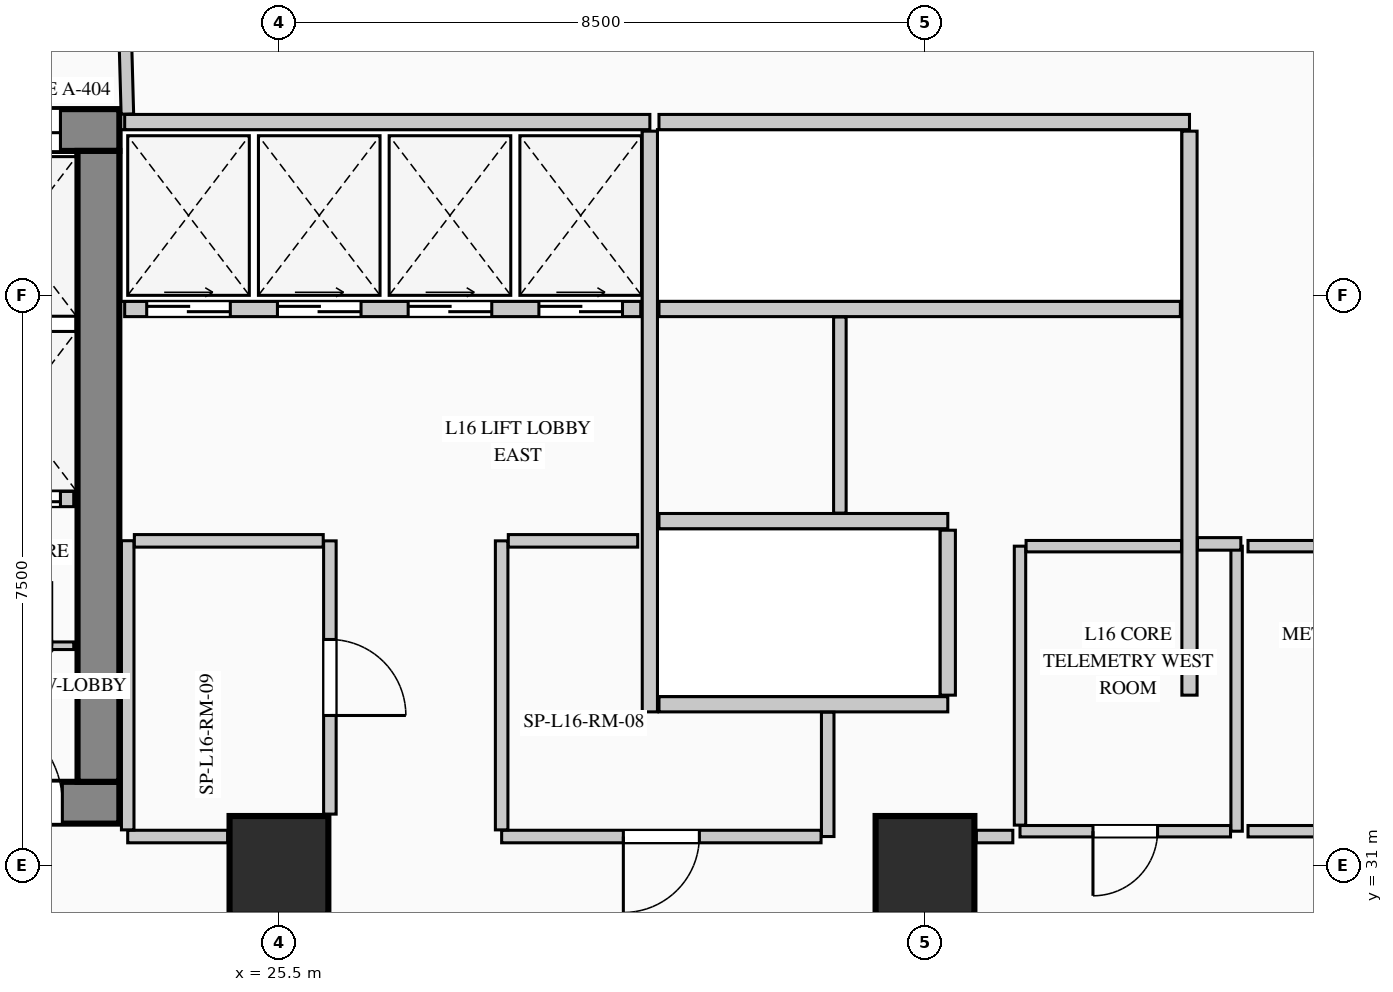
"""IFC4 building model, lengths in metres.
Left out: names, types, materials, properties, quantities, classifications, styles, units other than length and angle.
Written with IfcOpenShell. Run it as: python <this file> out.ifc"""

import sys

from ifc_helpers import new_model, si_unit, direction, frame, frame_2d, origin, origin_2d, place, context, subcontext, project, spatial, rectangle, extrude, element, fill, save


model = new_model("IFC4")
c1 = context("Model", 3, precision=1e-05, world=origin(), true_north=direction((0.0, 1.0)))
c2 = subcontext(c1, "Body", "Model", "MODEL_VIEW")
j1 = project(units=[si_unit("LENGTHUNIT", "METRE"), si_unit("PLANEANGLEUNIT", "RADIAN")], contexts=[c1])
p1 = place(None, origin())
s1 = spatial("IfcSite", under=j1, at=p1, CompositionType="ELEMENT")
p2 = place(p1, origin())
s2 = spatial("IfcBuilding", under=s1, at=p2, CompositionType="ELEMENT")
p3 = place(p2, frame((0.0, 0.0, 71.0)))
s3 = spatial("IfcBuildingStorey", under=s2, at=p3, CompositionType="ELEMENT", Elevation=71.0)
p4 = place(p3, frame((5.45, 40.675, 0.0), z_axis=(0.0, 0.0, 1.0), x_axis=(1.0, 0.0, 0.0)))
e1 = element("IfcWall", 1, at=p4, inside=s3, PredefinedType="SHEAR", context=c2, shape_type="SweptSolid", body=[
    extrude(rectangle(XDim=17.95, YDim=0.55, at=frame_2d((8.975, 0.0))), origin(), (0.0, 0.0, 1.0), 4.4),
])
p5 = place(p4, frame((15.995, 0.0, 0.0)))
e2 = element("IfcOpeningElement", 2, at=p5, cuts=e1, PredefinedType="OPENING", context=c2, shape_type="SweptSolid", body=[
    extrude(rectangle(XDim=1.18, YDim=2.25, at=frame_2d((0.59, 1.125))), frame((0.0, 0.285, 0.0), z_axis=(0.0, -1.0, 0.0), x_axis=(1.0, 0.0, 0.0)), (0.0, 0.0, 1.0), 0.57),
])
p6 = place(p3, frame((5.45, 31.825, 0.0), z_axis=(0.0, 0.0, 1.0), x_axis=(1.0, 0.0, 0.0)))
e3 = element("IfcWall", 3, at=p6, inside=s3, PredefinedType="SHEAR", context=c2, shape_type="SweptSolid", body=[
    extrude(rectangle(XDim=17.95, YDim=0.55, at=frame_2d((8.975, 0.0))), origin(), (0.0, 0.0, 1.0), 4.4),
])
p7 = place(p6, frame((3.2, 0.0, 0.0)))
e4 = element("IfcOpeningElement", 4, at=p7, cuts=e3, PredefinedType="OPENING", context=c2, shape_type="SweptSolid", body=[
    extrude(rectangle(XDim=1.2, YDim=2.2, at=frame_2d((0.6, 1.1))), frame((0.0, 0.285, 0.0), z_axis=(0.0, -1.0, 0.0), x_axis=(1.0, 0.0, 0.0)), (0.0, 0.0, 1.0), 0.57),
])
p8 = place(p6, frame((7.05, 0.0, 0.0)))
e5 = element("IfcOpeningElement", 5, at=p8, cuts=e3, PredefinedType="OPENING", context=c2, shape_type="SweptSolid", body=[
    extrude(rectangle(XDim=1.2, YDim=2.2, at=frame_2d((0.6, 1.1))), frame((0.0, 0.285, 0.0), z_axis=(0.0, -1.0, 0.0), x_axis=(1.0, 0.0, 0.0)), (0.0, 0.0, 1.0), 0.57),
])
p9 = place(p6, frame((8.9, 0.0, 0.0)))
e6 = element("IfcOpeningElement", 6, at=p9, cuts=e3, PredefinedType="OPENING", context=c2, shape_type="SweptSolid", body=[
    extrude(rectangle(XDim=1.15, YDim=2.2, at=frame_2d((0.575, 1.1))), frame((0.0, 0.285, 0.0), z_axis=(0.0, -1.0, 0.0), x_axis=(1.0, 0.0, 0.0)), (0.0, 0.0, 1.0), 0.57),
])
p10 = place(p6, frame((16.0, 0.0, 0.0)))
e7 = element("IfcOpeningElement", 7, at=p10, cuts=e3, PredefinedType="OPENING", context=c2, shape_type="SweptSolid", body=[
    extrude(rectangle(XDim=1.2, YDim=2.2, at=frame_2d((0.6, 1.1))), frame((0.0, 0.285, 0.0), z_axis=(0.0, -1.0, 0.0), x_axis=(1.0, 0.0, 0.0)), (0.0, 0.0, 1.0), 0.57),
])
p11 = place(p3, frame((23.125, 32.1, 0.0), z_axis=(0.0, 0.0, 1.0), x_axis=(0.0, 1.0, 0.0)))
e8 = element("IfcWall", 8, at=p11, inside=s3, PredefinedType="SHEAR", context=c2, shape_type="SweptSolid", body=[
    extrude(rectangle(XDim=8.3, YDim=0.55, at=frame_2d((4.15, 0.0))), origin(), (0.0, 0.0, 1.0), 4.4),
])
for number, where, z_axis, x_axis in (
    (9, (25.5, 31.0, 0.0), (0.0, 0.0, 1.0), (1.0, 0.0, 0.0)),
    (10, (34.0, 31.0, 0.0), (0.0, 0.0, 1.0), (1.0, 0.0, 0.0)),
):
    element("IfcColumn", number, at=place(p3, frame(where, z_axis=z_axis, x_axis=x_axis)), inside=s3, PredefinedType="COLUMN", context=c2, shape_type="SweptSolid", body=[
        extrude(rectangle(XDim=1.3, YDim=1.3, at=origin_2d()), origin(), (0.0, 0.0, 1.0), 4.4),
    ])
p12 = place(p3, frame((21.38, 33.89, 0.0), z_axis=(0.0, 0.0, 1.0), x_axis=(1.0, 0.0, 0.0)))
e11 = element("IfcWall", 11, at=p12, inside=s3, PredefinedType="PARTITIONING", context=c2, shape_type="SweptSolid", body=[
    extrude(rectangle(XDim=1.42, YDim=0.1, at=frame_2d((0.71, 0.0))), origin(), (0.0, 0.0, 1.0), 4.1),
])
p13 = place(p12, frame((0.28, 0.0, 0.0)))
e12 = element("IfcOpeningElement", 12, at=p13, cuts=e11, PredefinedType="OPENING", context=c2, shape_type="SweptSolid", body=[
    extrude(rectangle(XDim=0.85, YDim=2.1, at=frame_2d((0.425, 1.05))), frame((0.0, 0.06, 0.0), z_axis=(0.0, -1.0, 0.0), x_axis=(1.0, 0.0, 0.0)), (0.0, 0.0, 1.0), 0.12),
])
p14 = place(p3, frame((21.3, 35.82, 0.0), z_axis=(0.0, 0.0, 1.0), x_axis=(1.0, 0.0, 0.0)))
e13 = element("IfcWall", 13, at=p14, inside=s3, PredefinedType="PARTITIONING", context=c2, shape_type="SweptSolid", body=[
    extrude(rectangle(XDim=1.5, YDim=0.2, at=frame_2d((0.75, 0.0))), origin(), (0.0, 0.0, 1.0), 4.1),
])
p15 = place(p14, frame((0.145, 0.0, 0.0)))
e14 = element("IfcOpeningElement", 14, at=p15, cuts=e13, PredefinedType="OPENING", context=c2, shape_type="SweptSolid", body=[
    extrude(rectangle(XDim=1.18, YDim=2.25, at=frame_2d((0.59, 1.125))), frame((0.0, 0.11, 0.0), z_axis=(0.0, -1.0, 0.0), x_axis=(1.0, 0.0, 0.0)), (0.0, 0.0, 1.0), 0.22),
])
p16 = place(p3, frame((23.47, 40.78, 0.0), z_axis=(0.0, 0.0, 1.0), x_axis=(1.0, 0.0, 0.0)))
e15 = element("IfcWall", 15, at=p16, inside=s3, PredefinedType="PARTITIONING", context=c2, shape_type="SweptSolid", body=[
    extrude(rectangle(XDim=6.91, YDim=0.2, at=frame_2d((3.455, 0.0))), origin(), (0.0, 0.0, 1.0), 4.1),
])
p17 = place(p3, frame((30.38, 33.02, 0.0), z_axis=(0.0, 0.0, 1.0), x_axis=(0.0, 1.0, 0.0)))
e16 = element("IfcWall", 16, at=p17, inside=s3, PredefinedType="PARTITIONING", context=c2, shape_type="SweptSolid", body=[
    extrude(rectangle(XDim=7.64, YDim=0.2, at=frame_2d((3.82, 0.0))), origin(), (0.0, 0.0, 1.0), 4.1),
])
p18 = place(p3, frame((23.47, 38.32, 0.0), z_axis=(0.0, 0.0, 1.0), x_axis=(1.0, 0.0, 0.0)))
e17 = element("IfcWall", 17, at=p18, inside=s3, PredefinedType="PARTITIONING", context=c2, shape_type="SweptSolid", body=[
    extrude(rectangle(XDim=6.79, YDim=0.2, at=frame_2d((3.395, 0.0))), origin(), (0.0, 0.0, 1.0), 4.1),
])
p19 = place(p18, frame((0.29, 0.0, 0.0)))
e18 = element("IfcOpeningElement", 18, at=p19, cuts=e17, PredefinedType="OPENING", context=c2, shape_type="SweptSolid", body=[
    extrude(rectangle(XDim=1.1, YDim=2.2, at=frame_2d((0.55, 1.1))), frame((0.0, 0.11, 0.0), z_axis=(0.0, -1.0, 0.0), x_axis=(1.0, 0.0, 0.0)), (0.0, 0.0, 1.0), 0.22),
])
p20 = place(p18, frame((2.01, 0.0, 0.0)))
e19 = element("IfcOpeningElement", 19, at=p20, cuts=e17, PredefinedType="OPENING", context=c2, shape_type="SweptSolid", body=[
    extrude(rectangle(XDim=1.1, YDim=2.2, at=frame_2d((0.55, 1.1))), frame((0.0, 0.11, 0.0), z_axis=(0.0, -1.0, 0.0), x_axis=(1.0, 0.0, 0.0)), (0.0, 0.0, 1.0), 0.22),
])
p21 = place(p18, frame((3.73, 0.0, 0.0)))
e20 = element("IfcOpeningElement", 20, at=p21, cuts=e17, PredefinedType="OPENING", context=c2, shape_type="SweptSolid", body=[
    extrude(rectangle(XDim=1.1, YDim=2.2, at=frame_2d((0.55, 1.1))), frame((0.0, 0.11, 0.0), z_axis=(0.0, -1.0, 0.0), x_axis=(1.0, 0.0, 0.0)), (0.0, 0.0, 1.0), 0.22),
])
p22 = place(p18, frame((5.45, 0.0, 0.0)))
e21 = element("IfcOpeningElement", 21, at=p22, cuts=e17, PredefinedType="OPENING", context=c2, shape_type="SweptSolid", body=[
    extrude(rectangle(XDim=1.1, YDim=2.2, at=frame_2d((0.55, 1.1))), frame((0.0, 0.11, 0.0), z_axis=(0.0, -1.0, 0.0), x_axis=(1.0, 0.0, 0.0)), (0.0, 0.0, 1.0), 0.22),
])
p23 = place(p3, frame((30.5, 40.78, 0.0), z_axis=(0.0, 0.0, 1.0), x_axis=(1.0, 0.0, 0.0)))
e22 = element("IfcWall", 22, at=p23, inside=s3, PredefinedType="PARTITIONING", context=c2, shape_type="SweptSolid", body=[
    extrude(rectangle(XDim=6.98, YDim=0.2, at=frame_2d((3.49, 0.0))), origin(), (0.0, 0.0, 1.0), 4.1),
])
p24 = place(p3, frame((37.48, 33.24, 0.0), z_axis=(0.0, 0.0, 1.0), x_axis=(0.0, 1.0, 0.0)))
e23 = element("IfcWall", 23, at=p24, inside=s3, PredefinedType="PARTITIONING", context=c2, shape_type="SweptSolid", body=[
    extrude(rectangle(XDim=7.42, YDim=0.2, at=frame_2d((3.71, 0.0))), origin(), (0.0, 0.0, 1.0), 4.1),
])
p25 = place(p3, frame((30.5, 38.32, 0.0), z_axis=(0.0, 0.0, 1.0), x_axis=(1.0, 0.0, 0.0)))
e24 = element("IfcWall", 24, at=p25, inside=s3, PredefinedType="PARTITIONING", context=c2, shape_type="SweptSolid", body=[
    extrude(rectangle(XDim=6.86, YDim=0.2, at=frame_2d((3.43, 0.0))), origin(), (0.0, 0.0, 1.0), 4.1),
])
for number, where, z_axis, x_axis in (
    (25, (30.5, 35.53, 0.0), (0.0, 0.0, 1.0), (1.0, 0.0, 0.0)),
    (26, (30.5, 33.12, 0.0), (0.0, 0.0, 1.0), (1.0, 0.0, 0.0)),
):
    element("IfcWall", number, at=place(p3, frame(where, z_axis=z_axis, x_axis=x_axis)), inside=s3, PredefinedType="PARTITIONING", context=c2, shape_type="SweptSolid", body=[
        extrude(rectangle(XDim=3.8, YDim=0.2, at=frame_2d((1.9, 0.0))), origin(), (0.0, 0.0, 1.0), 4.1),
    ])
p26 = place(p3, frame((34.3, 33.24, 0.0), z_axis=(0.0, 0.0, 1.0), x_axis=(0.0, 1.0, 0.0)))
e27 = element("IfcWall", 27, at=p26, inside=s3, PredefinedType="PARTITIONING", context=c2, shape_type="SweptSolid", body=[
    extrude(rectangle(XDim=2.17, YDim=0.2, at=frame_2d((1.085, 0.0))), origin(), (0.0, 0.0, 1.0), 4.1),
])
p27 = place(p3, frame((38.1, 35.2, 0.0), z_axis=(0.0, 0.0, 1.0), x_axis=(0.0, -1.0, 0.0)))
e28 = element("IfcWall", 28, at=p27, inside=s3, PredefinedType="PARTITIONING", context=c2, shape_type="SweptSolid", body=[
    extrude(rectangle(XDim=3.75, YDim=0.15, at=frame_2d((1.875, 0.0))), origin(), (0.0, 0.0, 1.0), 4.1),
])
p28 = place(p3, frame((38.02, 31.45, 0.0), z_axis=(0.0, 0.0, 1.0), x_axis=(-1.0, 0.0, 0.0)))
e29 = element("IfcWall", 29, at=p28, inside=s3, PredefinedType="PARTITIONING", context=c2, shape_type="SweptSolid", body=[
    extrude(rectangle(XDim=2.77, YDim=0.15, at=frame_2d((1.385, 0.0))), origin(), (0.0, 0.0, 1.0), 4.1),
])
p29 = place(p28, frame((0.96, 0.0, 0.0)))
e30 = element("IfcOpeningElement", 30, at=p29, cuts=e29, PredefinedType="OPENING", context=c2, shape_type="SweptSolid", body=[
    extrude(rectangle(XDim=0.85, YDim=2.1, at=frame_2d((0.425, 1.05))), frame((0.0, 0.085, 0.0), z_axis=(0.0, -1.0, 0.0), x_axis=(1.0, 0.0, 0.0)), (0.0, 0.0, 1.0), 0.17),
])
p30 = place(p3, frame((35.25, 31.53, 0.0), z_axis=(0.0, 0.0, 1.0), x_axis=(0.0, 1.0, 0.0)))
e31 = element("IfcWall", 31, at=p30, inside=s3, PredefinedType="PARTITIONING", context=c2, shape_type="SweptSolid", body=[
    extrude(rectangle(XDim=3.67, YDim=0.15, at=frame_2d((1.835, 0.0))), origin(), (0.0, 0.0, 1.0), 4.1),
])
p31 = place(p3, frame((35.33, 35.2, 0.0), z_axis=(0.0, 0.0, 1.0), x_axis=(1.0, 0.0, 0.0)))
e32 = element("IfcWall", 32, at=p31, inside=s3, PredefinedType="PARTITIONING", context=c2, shape_type="SweptSolid", body=[
    extrude(rectangle(XDim=2.045, YDim=0.15, at=frame_2d((1.022, 0.0))), origin(), (0.0, 0.0, 1.0), 4.1),
])
p32 = place(p3, frame((41.07, 31.45, 0.0), z_axis=(0.0, 0.0, 1.0), x_axis=(-1.0, 0.0, 0.0)))
e33 = element("IfcWall", 33, at=p32, inside=s3, PredefinedType="PARTITIONING", context=c2, shape_type="SweptSolid", body=[
    extrude(rectangle(XDim=2.82, YDim=0.15, at=frame_2d((1.41, 0.0))), origin(), (0.0, 0.0, 1.0), 4.1),
])
p33 = place(p32, frame((0.985, 0.0, 0.0)))
e34 = element("IfcOpeningElement", 34, at=p33, cuts=e33, PredefinedType="OPENING", context=c2, shape_type="SweptSolid", body=[
    extrude(rectangle(XDim=0.85, YDim=2.1, at=frame_2d((0.425, 1.05))), frame((0.0, 0.085, 0.0), z_axis=(0.0, -1.0, 0.0), x_axis=(1.0, 0.0, 0.0)), (0.0, 0.0, 1.0), 0.17),
])
p34 = place(p3, frame((38.25, 35.2, 0.0), z_axis=(0.0, 0.0, 1.0), x_axis=(1.0, 0.0, 0.0)))
e35 = element("IfcWall", 35, at=p34, inside=s3, PredefinedType="PARTITIONING", context=c2, shape_type="SweptSolid", body=[
    extrude(rectangle(XDim=2.82, YDim=0.15, at=frame_2d((1.41, 0.0))), origin(), (0.0, 0.0, 1.0), 4.1),
])
p35 = place(p3, frame((32.72, 33.015, 0.0), z_axis=(0.0, 0.0, 1.0), x_axis=(0.0, -1.0, 0.0)))
e36 = element("IfcWall", 36, at=p35, inside=s3, PredefinedType="PARTITIONING", context=c2, shape_type="SweptSolid", body=[
    extrude(rectangle(XDim=1.635, YDim=0.165, at=frame_2d((0.817, 0.0))), origin(), (0.0, 0.0, 1.0), 4.1),
])
p36 = place(p3, frame((32.633, 31.38, 0.0), z_axis=(0.0, 0.0, 1.0), x_axis=(-1.0, 0.0, 0.0)))
e37 = element("IfcWall", 37, at=p36, inside=s3, PredefinedType="PARTITIONING", context=c2, shape_type="SweptSolid", body=[
    extrude(rectangle(XDim=4.203, YDim=0.165, at=frame_2d((2.101, 0.0))), origin(), (0.0, 0.0, 1.0), 4.1),
])
p37 = place(p36, frame((1.601, 0.0, 0.0)))
e38 = element("IfcOpeningElement", 38, at=p37, cuts=e37, PredefinedType="OPENING", context=c2, shape_type="SweptSolid", body=[
    extrude(rectangle(XDim=1.0, YDim=2.15, at=frame_2d((0.5, 1.075))), frame((0.0, 0.093, 0.0), z_axis=(0.0, -1.0, 0.0), x_axis=(1.0, 0.0, 0.0)), (0.0, 0.0, 1.0), 0.185),
])
p38 = place(p3, frame((28.43, 31.468, 0.0), z_axis=(0.0, 0.0, 1.0), x_axis=(0.0, 1.0, 0.0)))
e39 = element("IfcWall", 39, at=p38, inside=s3, PredefinedType="PARTITIONING", context=c2, shape_type="SweptSolid", body=[
    extrude(rectangle(XDim=3.802, YDim=0.165, at=frame_2d((1.901, 0.0))), origin(), (0.0, 0.0, 1.0), 4.1),
])
p39 = place(p3, frame((28.518, 35.27, 0.0), z_axis=(0.0, 0.0, 1.0), x_axis=(1.0, 0.0, 0.0)))
e40 = element("IfcWall", 40, at=p39, inside=s3, PredefinedType="PARTITIONING", context=c2, shape_type="SweptSolid", body=[
    extrude(rectangle(XDim=1.702, YDim=0.165, at=frame_2d((0.851, 0.0))), origin(), (0.0, 0.0, 1.0), 4.1),
])
p40 = place(p3, frame((26.17, 35.27, 0.0), z_axis=(0.0, 0.0, 1.0), x_axis=(0.0, -1.0, 0.0)))
e41 = element("IfcWall", 41, at=p40, inside=s3, PredefinedType="PARTITIONING", context=c2, shape_type="SweptSolid", body=[
    extrude(rectangle(XDim=3.595, YDim=0.165, at=frame_2d((1.797, 0.0))), origin(), (0.0, 0.0, 1.0), 4.1),
])
p41 = place(p40, frame((1.298, 0.0, 0.0)))
e42 = element("IfcOpeningElement", 42, at=p41, cuts=e41, PredefinedType="OPENING", context=c2, shape_type="SweptSolid", body=[
    extrude(rectangle(XDim=1.0, YDim=2.15, at=frame_2d((0.5, 1.075))), frame((0.0, 0.093, 0.0), z_axis=(0.0, -1.0, 0.0), x_axis=(1.0, 0.0, 0.0)), (0.0, 0.0, 1.0), 0.185),
])
p42 = place(p3, frame((24.825, 31.38, 0.0), z_axis=(0.0, 0.0, 1.0), x_axis=(-1.0, 0.0, 0.0)))
e43 = element("IfcWall", 43, at=p42, inside=s3, PredefinedType="PARTITIONING", context=c2, shape_type="SweptSolid", body=[
    extrude(rectangle(XDim=1.315, YDim=0.165, at=frame_2d((0.657, 0.0))), origin(), (0.0, 0.0, 1.0), 4.1),
])
p43 = place(p3, frame((23.51, 31.468, 0.0), z_axis=(0.0, 0.0, 1.0), x_axis=(0.0, 1.0, 0.0)))
e44 = element("IfcWall", 44, at=p43, inside=s3, PredefinedType="PARTITIONING", context=c2, shape_type="SweptSolid", body=[
    extrude(rectangle(XDim=3.804, YDim=0.165, at=frame_2d((1.902, 0.0))), origin(), (0.0, 0.0, 1.0), 4.1),
])
p44 = place(p3, frame((23.597, 35.27, 0.0), z_axis=(0.0, 0.0, 1.0), x_axis=(1.0, 0.0, 0.0)))
e45 = element("IfcWall", 45, at=p44, inside=s3, PredefinedType="PARTITIONING", context=c2, shape_type="SweptSolid", body=[
    extrude(rectangle(XDim=2.485, YDim=0.165, at=frame_2d((1.243, 0.0))), origin(), (0.0, 0.0, 1.0), 4.1),
])
p45 = place(p3, frame((38.156, 35.23, 0.0), z_axis=(0.0, 0.0, 1.0), x_axis=(-1.0, 0.0, 0.0)))
e46 = element("IfcWall", 46, at=p45, inside=s3, PredefinedType="PARTITIONING", context=c2, shape_type="SweptSolid", body=[
    extrude(rectangle(XDim=0.571, YDim=0.165, at=frame_2d((0.285, 0.0))), origin(), (0.0, 0.0, 1.0), 4.1),
])
p46 = place(p3, frame((35.156, 31.38, 0.0), z_axis=(0.0, 0.0, 1.0), x_axis=(-1.0, 0.0, 0.0)))
e47 = element("IfcWall", 47, at=p46, inside=s3, PredefinedType="PARTITIONING", context=c2, shape_type="SweptSolid", body=[
    extrude(rectangle(XDim=0.48, YDim=0.165, at=frame_2d((0.24, 0.0))), origin(), (0.0, 0.0, 1.0), 4.1),
])
p47 = place(p3, frame((32.88, 35.635, 0.0), z_axis=(0.0, 0.0, 1.0), x_axis=(0.0, 1.0, 0.0)))
e48 = element("IfcWall", 48, at=p47, inside=s3, PredefinedType="PARTITIONING", context=c2, shape_type="SweptSolid", body=[
    extrude(rectangle(XDim=2.58, YDim=0.165, at=frame_2d((1.29, 0.0))), origin(), (0.0, 0.0, 1.0), 4.1),
])
p48 = place(p3, frame((23.506, 40.885, 0.0), z_axis=(0.0, 0.0, 1.0), x_axis=(-0.027441464163, 0.999623412113, 0.0)))
e49 = element("IfcWall", 49, at=p48, inside=s3, PredefinedType="PARTITIONING", context=c2, shape_type="SweptSolid", body=[
    extrude(rectangle(XDim=2.331, YDim=0.165, at=frame_2d((1.166, 0.0))), origin(), (0.0, 0.0, 1.0), 4.1),
])
p49 = place(p10, origin())
e50 = element("IfcDoor", 50, at=p49, inside=s3, OperationType="SINGLE_SWING_LEFT", PredefinedType="DOOR", context=c2, shape_type="SweptSolid", body=[
    extrude(rectangle(XDim=1.2, YDim=2.2, at=frame_2d((0.6, 1.1))), frame((0.0, 0.025, 0.0), z_axis=(0.0, -1.0, 0.0), x_axis=(1.0, 0.0, 0.0)), (0.0, 0.0, 1.0), 0.05),
])
fill(e7, e50)
p50 = place(p5, origin())
e51 = element("IfcDoor", 51, at=p50, inside=s3, OperationType="DOUBLE_DOOR_SLIDING", PredefinedType="DOOR", context=c2, shape_type="SweptSolid", body=[
    extrude(rectangle(XDim=1.18, YDim=2.25, at=frame_2d((0.59, 1.125))), frame((0.0, 0.025, 0.0), z_axis=(0.0, -1.0, 0.0), x_axis=(1.0, 0.0, 0.0)), (0.0, 0.0, 1.0), 0.05),
])
fill(e2, e51)
p51 = place(p15, origin())
e52 = element("IfcDoor", 52, at=p51, inside=s3, OperationType="DOUBLE_DOOR_SLIDING", PredefinedType="DOOR", context=c2, shape_type="SweptSolid", body=[
    extrude(rectangle(XDim=1.18, YDim=2.25, at=frame_2d((0.59, 1.125))), frame((0.0, 0.025, 0.0), z_axis=(0.0, -1.0, 0.0), x_axis=(1.0, 0.0, 0.0)), (0.0, 0.0, 1.0), 0.05),
])
fill(e14, e52)
p52 = place(p19, origin())
e53 = element("IfcDoor", 53, at=p52, inside=s3, OperationType="DOUBLE_DOOR_SLIDING", PredefinedType="DOOR", context=c2, shape_type="SweptSolid", body=[
    extrude(rectangle(XDim=1.1, YDim=2.2, at=frame_2d((0.55, 1.1))), frame((0.0, 0.025, 0.0), z_axis=(0.0, -1.0, 0.0), x_axis=(1.0, 0.0, 0.0)), (0.0, 0.0, 1.0), 0.05),
])
fill(e18, e53)
p53 = place(p20, origin())
e54 = element("IfcDoor", 54, at=p53, inside=s3, OperationType="DOUBLE_DOOR_SLIDING", PredefinedType="DOOR", context=c2, shape_type="SweptSolid", body=[
    extrude(rectangle(XDim=1.1, YDim=2.2, at=frame_2d((0.55, 1.1))), frame((0.0, 0.025, 0.0), z_axis=(0.0, -1.0, 0.0), x_axis=(1.0, 0.0, 0.0)), (0.0, 0.0, 1.0), 0.05),
])
fill(e19, e54)
p54 = place(p21, origin())
e55 = element("IfcDoor", 55, at=p54, inside=s3, OperationType="DOUBLE_DOOR_SLIDING", PredefinedType="DOOR", context=c2, shape_type="SweptSolid", body=[
    extrude(rectangle(XDim=1.1, YDim=2.2, at=frame_2d((0.55, 1.1))), frame((0.0, 0.025, 0.0), z_axis=(0.0, -1.0, 0.0), x_axis=(1.0, 0.0, 0.0)), (0.0, 0.0, 1.0), 0.05),
])
fill(e20, e55)
p55 = place(p22, origin())
e56 = element("IfcDoor", 56, at=p55, inside=s3, OperationType="DOUBLE_DOOR_SLIDING", PredefinedType="DOOR", context=c2, shape_type="SweptSolid", body=[
    extrude(rectangle(XDim=1.1, YDim=2.2, at=frame_2d((0.55, 1.1))), frame((0.0, 0.025, 0.0), z_axis=(0.0, -1.0, 0.0), x_axis=(1.0, 0.0, 0.0)), (0.0, 0.0, 1.0), 0.05),
])
fill(e21, e56)
p56 = place(p29, origin())
e57 = element("IfcDoor", 57, at=p56, inside=s3, OperationType="SINGLE_SWING_RIGHT", PredefinedType="DOOR", context=c2, shape_type="SweptSolid", body=[
    extrude(rectangle(XDim=0.85, YDim=2.1, at=frame_2d((0.425, 1.05))), frame((0.0, 0.025, 0.0), z_axis=(0.0, -1.0, 0.0), x_axis=(1.0, 0.0, 0.0)), (0.0, 0.0, 1.0), 0.05),
])
fill(e30, e57)
p57 = place(p37, origin())
e58 = element("IfcDoor", 58, at=p57, inside=s3, OperationType="SINGLE_SWING_RIGHT", PredefinedType="DOOR", context=c2, shape_type="SweptSolid", body=[
    extrude(rectangle(XDim=1.0, YDim=2.15, at=frame_2d((0.5, 1.075))), frame((0.0, 0.025, 0.0), z_axis=(0.0, -1.0, 0.0), x_axis=(1.0, 0.0, 0.0)), (0.0, 0.0, 1.0), 0.05),
])
fill(e38, e58)
p58 = place(p41, origin())
e59 = element("IfcDoor", 59, at=p58, inside=s3, OperationType="SINGLE_SWING_RIGHT", PredefinedType="DOOR", context=c2, shape_type="SweptSolid", body=[
    extrude(rectangle(XDim=1.0, YDim=2.15, at=frame_2d((0.5, 1.075))), frame((0.0, 0.025, 0.0), z_axis=(0.0, -1.0, 0.0), x_axis=(1.0, 0.0, 0.0)), (0.0, 0.0, 1.0), 0.05),
])
fill(e42, e59)
save(model, sys.argv[1])
